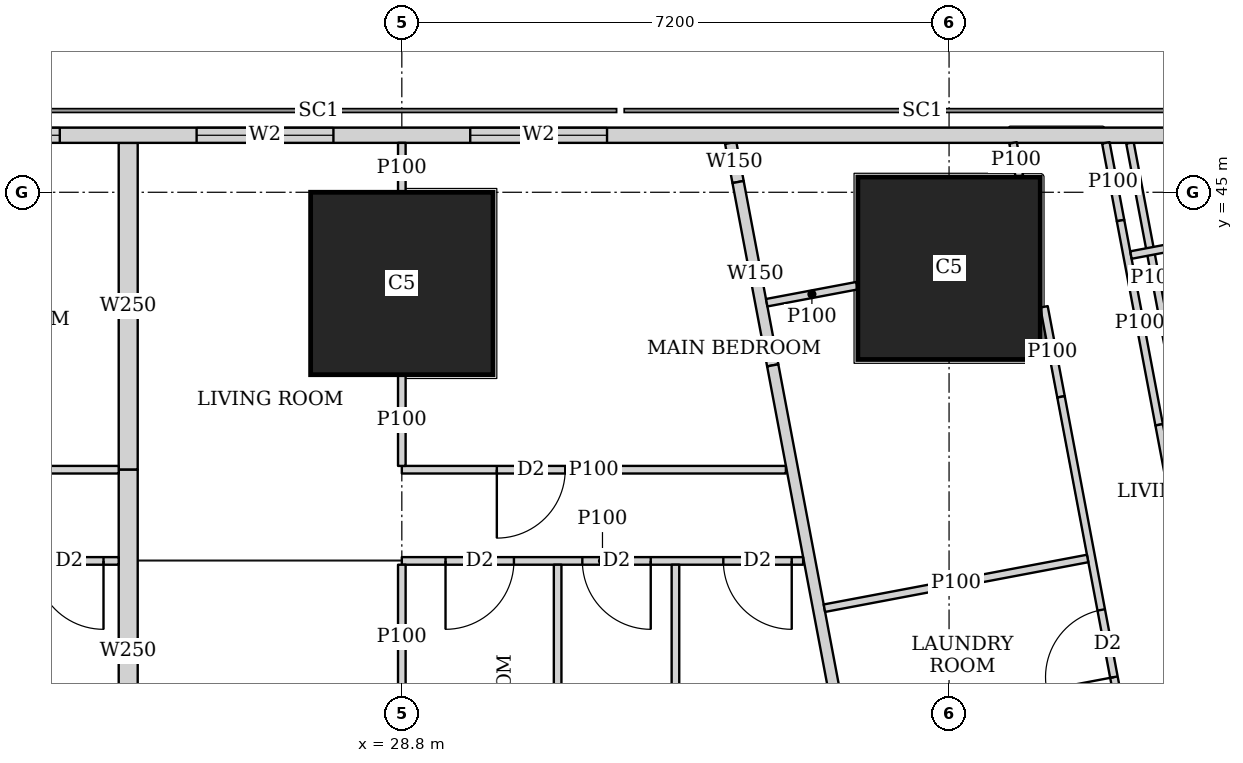
"""IFC4 building model, lengths in metres.
Left out: names, types, materials, properties, quantities, classifications, styles, units other than length and angle.
Written with IfcOpenShell. Run it as: python <this file> out.ifc"""

import sys

from ifc_helpers import new_model, si_unit, direction, frame, frame_2d, origin, origin_2d, place, context, subcontext, project, spatial, rectangle, extrude, element, fill, save


model = new_model("IFC4")
c1 = context("Model", 3, precision=1e-05, world=origin(), true_north=direction((0.0, 1.0)))
c2 = subcontext(c1, "Body", "Model", "MODEL_VIEW")
j1 = project(units=[si_unit("LENGTHUNIT", "METRE"), si_unit("PLANEANGLEUNIT", "RADIAN")], contexts=[c1])
p1 = place(None, origin())
s1 = spatial("IfcSite", under=j1, at=p1, CompositionType="ELEMENT")
p2 = place(p1, origin())
s2 = spatial("IfcBuilding", under=s1, at=p2, CompositionType="ELEMENT")
p3 = place(p2, frame((0.0, 0.0, 204.95)))
s3 = spatial("IfcBuildingStorey", under=s2, at=p3, CompositionType="ELEMENT", Elevation=204.95)
for number, where, z_axis, x_axis in (
    (1, (28.8, 43.8, 0.0), (0.0, 0.0, 1.0), (1.0, 0.0, 0.0)),
    (2, (36.0, 44.0, 0.0), (0.0, 0.0, 1.0), (1.0, 0.0, 0.0)),
):
    element("IfcColumn", number, at=place(p3, frame(where, z_axis=z_axis, x_axis=x_axis)), inside=s3, PredefinedType="COLUMN", context=c2, shape_type="SweptSolid", body=[
        extrude(rectangle(XDim=2.4, YDim=2.4, at=origin_2d()), origin(), (0.0, 0.0, 1.0), 3.75),
    ])
p4 = place(p3, frame((40.106, 45.75, 0.0), z_axis=(0.0, 0.0, 1.0), x_axis=(-1.0, 0.0, 0.0)))
e3 = element("IfcWall", 3, at=p4, inside=s3, PredefinedType="SOLIDWALL", context=c2, shape_type="SweptSolid", body=[
    extrude(rectangle(XDim=32.743, YDim=0.2, at=frame_2d((16.372, 0.0))), origin(), (0.0, 0.0, 1.0), 3.5),
])
p5 = place(p4, frame((8.606, 0.0, 0.9)))
e4 = element("IfcOpeningElement", 4, at=p5, cuts=e3, PredefinedType="OPENING", context=c2, shape_type="SweptSolid", body=[
    extrude(rectangle(XDim=1.8, YDim=1.5, at=frame_2d((0.9, 0.75))), frame((0.0, 0.11, 0.0), z_axis=(0.0, -1.0, 0.0), x_axis=(1.0, 0.0, 0.0)), (0.0, 0.0, 1.0), 0.22),
])
p6 = place(p4, frame((12.206, 0.0, 0.9)))
e5 = element("IfcOpeningElement", 5, at=p6, cuts=e3, PredefinedType="OPENING", context=c2, shape_type="SweptSolid", body=[
    extrude(rectangle(XDim=1.8, YDim=1.5, at=frame_2d((0.9, 0.75))), frame((0.0, 0.11, 0.0), z_axis=(0.0, -1.0, 0.0), x_axis=(1.0, 0.0, 0.0)), (0.0, 0.0, 1.0), 0.22),
])
p7 = place(p4, frame((15.806, 0.0, 0.9)))
e6 = element("IfcOpeningElement", 6, at=p7, cuts=e3, PredefinedType="OPENING", context=c2, shape_type="SweptSolid", body=[
    extrude(rectangle(XDim=1.8, YDim=1.5, at=frame_2d((0.9, 0.75))), frame((0.0, 0.11, 0.0), z_axis=(0.0, -1.0, 0.0), x_axis=(1.0, 0.0, 0.0)), (0.0, 0.0, 1.0), 0.22),
])
p8 = place(p4, frame((19.406, 0.0, 0.9)))
e7 = element("IfcOpeningElement", 7, at=p8, cuts=e3, PredefinedType="OPENING", context=c2, shape_type="SweptSolid", body=[
    extrude(rectangle(XDim=1.8, YDim=1.5, at=frame_2d((0.9, 0.75))), frame((0.0, 0.11, 0.0), z_axis=(0.0, -1.0, 0.0), x_axis=(1.0, 0.0, 0.0)), (0.0, 0.0, 1.0), 0.22),
])
p9 = place(p4, frame((23.006, 0.0, 0.9)))
e8 = element("IfcOpeningElement", 8, at=p9, cuts=e3, PredefinedType="OPENING", context=c2, shape_type="SweptSolid", body=[
    extrude(rectangle(XDim=1.8, YDim=1.5, at=frame_2d((0.9, 0.75))), frame((0.0, 0.11, 0.0), z_axis=(0.0, -1.0, 0.0), x_axis=(1.0, 0.0, 0.0)), (0.0, 0.0, 1.0), 0.22),
])
p10 = place(p4, frame((28.025, 0.0, 0.9)))
e9 = element("IfcOpeningElement", 9, at=p10, cuts=e3, PredefinedType="OPENING", context=c2, shape_type="SweptSolid", body=[
    extrude(rectangle(XDim=2.4, YDim=1.5, at=frame_2d((1.2, 0.75))), frame((0.0, 0.11, 0.0), z_axis=(0.0, -1.0, 0.0), x_axis=(1.0, 0.0, 0.0)), (0.0, 0.0, 1.0), 0.22),
])
p11 = place(p3, frame((33.127, 45.65, 0.0), z_axis=(0.0, 0.0, 1.0), x_axis=(0.185441815104, -0.982655246366, 0.0)))
e10 = element("IfcWall", 10, at=p11, inside=s3, PredefinedType="SOLIDWALL", context=c2, shape_type="SweptSolid", body=[
    extrude(rectangle(XDim=0.524, YDim=0.15, at=frame_2d((0.262, 0.0))), origin(), (0.0, 0.0, 1.0), 3.5),
])
p12 = place(p3, frame((33.224, 45.135, 0.0), z_axis=(0.0, 0.0, 1.0), x_axis=(0.185681462868, -0.982609990967, 0.0)))
e11 = element("IfcWall", 11, at=p12, inside=s3, PredefinedType="SOLIDWALL", context=c2, shape_type="SweptSolid", body=[
    extrude(rectangle(XDim=2.455, YDim=0.15, at=frame_2d((1.228, 0.0))), origin(), (0.0, 0.0, 1.0), 2.05),
])
p13 = place(p3, frame((33.68, 42.723, 0.0), z_axis=(0.0, 0.0, 1.0), x_axis=(0.185601160014, -0.982625162207, 0.0)))
e12 = element("IfcWall", 12, at=p13, inside=s3, PredefinedType="SOLIDWALL", context=c2, shape_type="SweptSolid", body=[
    extrude(rectangle(XDim=41.051, YDim=0.15, at=frame_2d((20.526, 0.0))), origin(), (0.0, 0.0, 1.0), 2.5),
])
p14 = place(p13, frame((12.307, 0.0, 0.0)))
e13 = element("IfcOpeningElement", 13, at=p14, cuts=e12, PredefinedType="OPENING", context=c2, shape_type="SweptSolid", body=[
    extrude(rectangle(XDim=1.0, YDim=2.1, at=frame_2d((0.5, 1.05))), frame((0.0, 0.085, 0.0), z_axis=(0.0, -1.0, 0.0), x_axis=(1.0, 0.0, 0.0)), (0.0, 0.0, 1.0), 0.17),
])
p15 = place(p13, frame((16.123, 0.0, 0.0)))
e14 = element("IfcOpeningElement", 14, at=p15, cuts=e12, PredefinedType="OPENING", context=c2, shape_type="SweptSolid", body=[
    extrude(rectangle(XDim=1.0, YDim=2.1, at=frame_2d((0.5, 1.05))), frame((0.0, 0.085, 0.0), z_axis=(0.0, -1.0, 0.0), x_axis=(1.0, 0.0, 0.0)), (0.0, 0.0, 1.0), 0.17),
])
p16 = place(p13, frame((30.902, 0.0, 0.0)))
e15 = element("IfcOpeningElement", 15, at=p16, cuts=e12, PredefinedType="OPENING", context=c2, shape_type="SweptSolid", body=[
    extrude(rectangle(XDim=1.0, YDim=2.1, at=frame_2d((0.5, 1.05))), frame((0.0, 0.085, 0.0), z_axis=(0.0, -1.0, 0.0), x_axis=(1.0, 0.0, 0.0)), (0.0, 0.0, 1.0), 0.17),
])
p17 = place(p3, frame((39.054, 42.085, 0.0), z_axis=(0.0, 0.0, 1.0), x_axis=(-0.185791584218, 0.982589175207, 0.0)))
e16 = element("IfcWall", 16, at=p17, inside=s3, PredefinedType="PARTITIONING", context=c2, shape_type="SweptSolid", body=[
    extrude(rectangle(XDim=3.628, YDim=0.1, at=frame_2d((1.814, 0.0))), origin(), (0.0, 0.0, 1.0), 2.05),
])
p18 = place(p3, frame((38.063, 45.65, 0.0), z_axis=(0.0, 0.0, 1.0), x_axis=(0.185677287841, -0.982610779902, 0.0)))
e17 = element("IfcWall", 17, at=p18, inside=s3, PredefinedType="PARTITIONING", context=c2, shape_type="SweptSolid", body=[
    extrude(rectangle(XDim=1.04, YDim=0.1, at=frame_2d((0.52, 0.0))), origin(), (0.0, 0.0, 1.0), 3.5),
])
p19 = place(p3, frame((38.256, 44.628, 0.0), z_axis=(0.0, 0.0, 1.0), x_axis=(0.185700639943, -0.982606366927, 0.0)))
e18 = element("IfcWall", 18, at=p19, inside=s3, PredefinedType="PARTITIONING", context=c2, shape_type="SweptSolid", body=[
    extrude(rectangle(XDim=2.735, YDim=0.1, at=frame_2d((1.367, 0.0))), origin(), (0.0, 0.0, 1.0), 2.05),
])
p20 = place(p3, frame((38.764, 41.941, 0.0), z_axis=(0.0, 0.0, 1.0), x_axis=(0.185548572312, -0.982635093671, 0.0)))
e19 = element("IfcWall", 19, at=p20, inside=s3, PredefinedType="PARTITIONING", context=c2, shape_type="SweptSolid", body=[
    extrude(rectangle(XDim=9.135, YDim=0.1, at=frame_2d((4.568, 0.0))), origin(), (0.0, 0.0, 1.0), 3.5),
])
p21 = place(p20, frame((8.085, 0.0, 0.0)))
e20 = element("IfcOpeningElement", 20, at=p21, cuts=e19, PredefinedType="OPENING", context=c2, shape_type="SweptSolid", body=[
    extrude(rectangle(XDim=0.9, YDim=2.1, at=frame_2d((0.45, 1.05))), frame((0.0, 0.06, 0.0), z_axis=(0.0, -1.0, 0.0), x_axis=(1.0, 0.0, 0.0)), (0.0, 0.0, 1.0), 0.12),
])
p22 = place(p20, frame((3.7, 0.0, 0.0)))
e21 = element("IfcOpeningElement", 21, at=p22, cuts=e19, PredefinedType="OPENING", context=c2, shape_type="SweptSolid", body=[
    extrude(rectangle(XDim=0.9, YDim=2.1, at=frame_2d((0.45, 1.05))), frame((0.0, 0.06, 0.0), z_axis=(0.0, -1.0, 0.0), x_axis=(1.0, 0.0, 0.0)), (0.0, 0.0, 1.0), 0.12),
])
p23 = place(p3, frame((36.842, 45.65, 0.0), z_axis=(0.0, 0.0, 1.0), x_axis=(0.185407859198, -0.982661653748, 0.0)))
e22 = element("IfcWall", 22, at=p23, inside=s3, PredefinedType="PARTITIONING", context=c2, shape_type="SweptSolid", body=[
    extrude(rectangle(XDim=0.448, YDim=0.1, at=frame_2d((0.224, 0.0))), origin(), (0.0, 0.0, 1.0), 3.5),
])
p24 = place(p3, frame((37.249, 43.493, 0.0), z_axis=(0.0, 0.0, 1.0), x_axis=(0.185817643817, -0.982584247404, 0.0)))
e23 = element("IfcWall", 23, at=p24, inside=s3, PredefinedType="PARTITIONING", context=c2, shape_type="SweptSolid", body=[
    extrude(rectangle(XDim=1.205, YDim=0.1, at=frame_2d((0.603, 0.0))), origin(), (0.0, 0.0, 1.0), 2.05),
])
p25 = place(p3, frame((37.473, 42.309, 0.0), z_axis=(0.0, 0.0, 1.0), x_axis=(0.185491912953, -0.982645790827, 0.0)))
e24 = element("IfcWall", 24, at=p25, inside=s3, PredefinedType="PARTITIONING", context=c2, shape_type="SweptSolid", body=[
    extrude(rectangle(XDim=9.737, YDim=0.1, at=frame_2d((4.869, 0.0))), origin(), (0.0, 0.0, 1.0), 3.5),
])
p26 = place(p25, frame((8.312, 0.0, 0.0)))
e25 = element("IfcOpeningElement", 25, at=p26, cuts=e24, PredefinedType="OPENING", context=c2, shape_type="SweptSolid", body=[
    extrude(rectangle(XDim=0.9, YDim=2.1, at=frame_2d((0.45, 1.05))), frame((0.0, 0.06, 0.0), z_axis=(0.0, -1.0, 0.0), x_axis=(1.0, 0.0, 0.0)), (0.0, 0.0, 1.0), 0.12),
])
p27 = place(p25, frame((2.853, 0.0, 0.0)))
e26 = element("IfcOpeningElement", 26, at=p27, cuts=e24, PredefinedType="OPENING", context=c2, shape_type="SweptSolid", body=[
    extrude(rectangle(XDim=0.9, YDim=2.1, at=frame_2d((0.45, 1.05))), frame((0.0, 0.06, 0.0), z_axis=(0.0, -1.0, 0.0), x_axis=(1.0, 0.0, 0.0)), (0.0, 0.0, 1.0), 0.12),
])
p28 = place(p25, frame((5.644, 0.0, 0.0)))
e27 = element("IfcOpeningElement", 27, at=p28, cuts=e24, PredefinedType="OPENING", context=c2, shape_type="SweptSolid", body=[
    extrude(rectangle(XDim=0.9, YDim=2.1, at=frame_2d((0.45, 1.05))), frame((0.0, 0.06, 0.0), z_axis=(0.0, -1.0, 0.0), x_axis=(1.0, 0.0, 0.0)), (0.0, 0.0, 1.0), 0.12),
])
p29 = place(p3, frame((41.968, 44.85, 0.0), z_axis=(0.0, 0.0, 1.0), x_axis=(-0.98258614234, -0.185807623311, 0.0)))
e28 = element("IfcWall", 28, at=p29, inside=s3, PredefinedType="PARTITIONING", context=c2, shape_type="SweptSolid", body=[
    extrude(rectangle(XDim=3.638, YDim=0.1, at=frame_2d((1.819, 0.0))), origin(), (0.0, 0.0, 1.0), 2.05),
])
p30 = place(p3, frame((34.79, 43.771, 0.0), z_axis=(0.0, 0.0, 1.0), x_axis=(-0.982730261052, -0.18504387051, 0.0)))
e29 = element("IfcWall", 29, at=p30, inside=s3, PredefinedType="PARTITIONING", context=c2, shape_type="SweptSolid", body=[
    extrude(rectangle(XDim=1.21, YDim=0.1, at=frame_2d((0.605, 0.0))), origin(), (0.0, 0.0, 1.0), 2.05),
])
p31 = place(p3, frame((37.823, 40.182, 0.0), z_axis=(0.0, 0.0, 1.0), x_axis=(-0.98263926043, -0.185526504472, 0.0)))
e30 = element("IfcWall", 30, at=p31, inside=s3, PredefinedType="PARTITIONING", context=c2, shape_type="SweptSolid", body=[
    extrude(rectangle(XDim=3.524, YDim=0.1, at=frame_2d((1.762, 0.0))), origin(), (0.0, 0.0, 1.0), 3.5),
])
p32 = place(p3, frame((21.6, 41.35, 0.0), z_axis=(0.0, 0.0, 1.0), x_axis=(1.0, 0.0, 0.0)))
e31 = element("IfcWall", 31, at=p32, inside=s3, PredefinedType="PARTITIONING", context=c2, shape_type="SweptSolid", body=[
    extrude(rectangle(XDim=3.475, YDim=0.1, at=frame_2d((1.737, 0.0))), origin(), (0.0, 0.0, 1.0), 3.5),
])
p33 = place(p32, frame((0.2, 0.0, 0.0)))
e32 = element("IfcOpeningElement", 32, at=p33, cuts=e31, PredefinedType="OPENING", context=c2, shape_type="SweptSolid", body=[
    extrude(rectangle(XDim=0.9, YDim=2.1, at=frame_2d((0.45, 1.05))), frame((0.0, 0.06, 0.0), z_axis=(0.0, -1.0, 0.0), x_axis=(1.0, 0.0, 0.0)), (0.0, 0.0, 1.0), 0.12),
])
p34 = place(p3, frame((21.6, 40.15, 0.0), z_axis=(0.0, 0.0, 1.0), x_axis=(1.0, 0.0, 0.0)))
e33 = element("IfcWall", 33, at=p34, inside=s3, PredefinedType="PARTITIONING", context=c2, shape_type="SweptSolid", body=[
    extrude(rectangle(XDim=3.475, YDim=0.1, at=frame_2d((1.737, 0.0))), origin(), (0.0, 0.0, 1.0), 3.5),
])
p35 = place(p34, frame((0.575, 0.0, 0.0)))
e34 = element("IfcOpeningElement", 34, at=p35, cuts=e33, PredefinedType="OPENING", context=c2, shape_type="SweptSolid", body=[
    extrude(rectangle(XDim=0.9, YDim=2.1, at=frame_2d((0.45, 1.05))), frame((0.0, 0.06, 0.0), z_axis=(0.0, -1.0, 0.0), x_axis=(1.0, 0.0, 0.0)), (0.0, 0.0, 1.0), 0.12),
])
p36 = place(p34, frame((2.375, 0.0, 0.0)))
e35 = element("IfcOpeningElement", 35, at=p36, cuts=e33, PredefinedType="OPENING", context=c2, shape_type="SweptSolid", body=[
    extrude(rectangle(XDim=0.9, YDim=2.1, at=frame_2d((0.45, 1.05))), frame((0.0, 0.06, 0.0), z_axis=(0.0, -1.0, 0.0), x_axis=(1.0, 0.0, 0.0)), (0.0, 0.0, 1.0), 0.12),
])
p37 = place(p3, frame((28.8, 41.35, 0.0), z_axis=(0.0, 0.0, 1.0), x_axis=(1.0, 0.0, 0.0)))
e36 = element("IfcWall", 36, at=p37, inside=s3, PredefinedType="PARTITIONING", context=c2, shape_type="SweptSolid", body=[
    extrude(rectangle(XDim=5.053, YDim=0.1, at=frame_2d((2.526, 0.0))), origin(), (0.0, 0.0, 1.0), 3.5),
])
p38 = place(p37, frame((1.25, 0.0, 0.0)))
e37 = element("IfcOpeningElement", 37, at=p38, cuts=e36, PredefinedType="OPENING", context=c2, shape_type="SweptSolid", body=[
    extrude(rectangle(XDim=0.9, YDim=2.1, at=frame_2d((0.45, 1.05))), frame((0.0, 0.06, 0.0), z_axis=(0.0, -1.0, 0.0), x_axis=(1.0, 0.0, 0.0)), (0.0, 0.0, 1.0), 0.12),
])
p39 = place(p3, frame((28.8, 40.15, 0.0), z_axis=(0.0, 0.0, 1.0), x_axis=(1.0, 0.0, 0.0)))
e38 = element("IfcWall", 38, at=p39, inside=s3, PredefinedType="PARTITIONING", context=c2, shape_type="SweptSolid", body=[
    extrude(rectangle(XDim=5.28, YDim=0.1, at=frame_2d((2.64, 0.0))), origin(), (0.0, 0.0, 1.0), 3.5),
])
p40 = place(p39, frame((0.575, 0.0, 0.0)))
e39 = element("IfcOpeningElement", 39, at=p40, cuts=e38, PredefinedType="OPENING", context=c2, shape_type="SweptSolid", body=[
    extrude(rectangle(XDim=0.9, YDim=2.1, at=frame_2d((0.45, 1.05))), frame((0.0, 0.06, 0.0), z_axis=(0.0, -1.0, 0.0), x_axis=(1.0, 0.0, 0.0)), (0.0, 0.0, 1.0), 0.12),
])
p41 = place(p39, frame((4.23, 0.0, 0.0)))
e40 = element("IfcOpeningElement", 40, at=p41, cuts=e38, PredefinedType="OPENING", context=c2, shape_type="SweptSolid", body=[
    extrude(rectangle(XDim=0.9, YDim=2.1, at=frame_2d((0.45, 1.05))), frame((0.0, 0.06, 0.0), z_axis=(0.0, -1.0, 0.0), x_axis=(1.0, 0.0, 0.0)), (0.0, 0.0, 1.0), 0.12),
])
p42 = place(p39, frame((2.375, 0.0, 0.0)))
e41 = element("IfcOpeningElement", 41, at=p42, cuts=e38, PredefinedType="OPENING", context=c2, shape_type="SweptSolid", body=[
    extrude(rectangle(XDim=0.9, YDim=2.1, at=frame_2d((0.45, 1.05))), frame((0.0, 0.06, 0.0), z_axis=(0.0, -1.0, 0.0), x_axis=(1.0, 0.0, 0.0)), (0.0, 0.0, 1.0), 0.12),
])
p43 = place(p3, frame((28.8, 41.4, 0.0), z_axis=(0.0, 0.0, 1.0), x_axis=(0.0, 1.0, 0.0)))
e42 = element("IfcWall", 42, at=p43, inside=s3, PredefinedType="PARTITIONING", context=c2, shape_type="SweptSolid", body=[
    extrude(rectangle(XDim=1.199, YDim=0.1, at=frame_2d((0.6, 0.0))), origin(), (0.0, 0.0, 1.0), 3.5),
])
p44 = place(p3, frame((28.8, 45.001, 0.0), z_axis=(0.0, 0.0, 1.0), x_axis=(0.0, 1.0, 0.0)))
e43 = element("IfcWall", 43, at=p44, inside=s3, PredefinedType="PARTITIONING", context=c2, shape_type="SweptSolid", body=[
    extrude(rectangle(XDim=0.649, YDim=0.1, at=frame_2d((0.324, 0.0))), origin(), (0.0, 0.0, 1.0), 3.5),
])
p45 = place(p3, frame((28.8, 38.201, 0.0), z_axis=(0.0, 0.0, 1.0), x_axis=(0.0, 1.0, 0.0)))
e44 = element("IfcWall", 44, at=p45, inside=s3, PredefinedType="PARTITIONING", context=c2, shape_type="SweptSolid", body=[
    extrude(rectangle(XDim=1.899, YDim=0.1, at=frame_2d((0.95, 0.0))), origin(), (0.0, 0.0, 1.0), 3.5),
])
for number, where, z_axis, x_axis in (
    (45, (32.4, 36.575, 0.0), (0.0, 0.0, 1.0), (0.0, 1.0, 0.0)),
    (46, (30.85, 36.575, 0.0), (0.0, 0.0, 1.0), (0.0, 1.0, 0.0)),
):
    element("IfcWall", number, at=place(p3, frame(where, z_axis=z_axis, x_axis=x_axis)), inside=s3, PredefinedType="PARTITIONING", context=c2, shape_type="SweptSolid", body=[
        extrude(rectangle(XDim=3.525, YDim=0.1, at=frame_2d((1.763, 0.0))), origin(), (0.0, 0.0, 1.0), 3.5),
    ])
p46 = place(p3, frame((25.2, 41.35, 0.0), z_axis=(0.0, 0.0, 1.0), x_axis=(0.0, 1.0, 0.0)))
e47 = element("IfcWall", 47, at=p46, inside=s3, PredefinedType="SOLIDWALL", context=c2, shape_type="SweptSolid", body=[
    extrude(rectangle(XDim=4.3, YDim=0.25, at=frame_2d((2.15, 0.0))), origin(), (0.0, 0.0, 1.0), 2.05),
])
p47 = place(p3, frame((25.2, 36.575, 0.0), z_axis=(0.0, 0.0, 1.0), x_axis=(0.0, 1.0, 0.0)))
e48 = element("IfcWall", 48, at=p47, inside=s3, PredefinedType="SOLIDWALL", context=c2, shape_type="SweptSolid", body=[
    extrude(rectangle(XDim=4.775, YDim=0.25, at=frame_2d((2.388, 0.0))), origin(), (0.0, 0.0, 1.0), 3.5),
])
p48 = place(p5, origin())
e49 = element("IfcWindow", 49, at=p48, inside=s3, PartitioningType="SINGLE_PANEL", PredefinedType="WINDOW", context=c2, shape_type="SweptSolid", body=[
    extrude(rectangle(XDim=1.8, YDim=1.5, at=frame_2d((0.9, 0.75))), frame((0.0, 0.03, 0.0), z_axis=(0.0, -1.0, 0.0), x_axis=(1.0, 0.0, 0.0)), (0.0, 0.0, 1.0), 0.06),
])
fill(e4, e49)
p49 = place(p6, origin())
e50 = element("IfcWindow", 50, at=p49, inside=s3, PartitioningType="SINGLE_PANEL", PredefinedType="WINDOW", context=c2, shape_type="SweptSolid", body=[
    extrude(rectangle(XDim=1.8, YDim=1.5, at=frame_2d((0.9, 0.75))), frame((0.0, 0.03, 0.0), z_axis=(0.0, -1.0, 0.0), x_axis=(1.0, 0.0, 0.0)), (0.0, 0.0, 1.0), 0.06),
])
fill(e5, e50)
p50 = place(p7, origin())
e51 = element("IfcWindow", 51, at=p50, inside=s3, PartitioningType="SINGLE_PANEL", PredefinedType="WINDOW", context=c2, shape_type="SweptSolid", body=[
    extrude(rectangle(XDim=1.8, YDim=1.5, at=frame_2d((0.9, 0.75))), frame((0.0, 0.03, 0.0), z_axis=(0.0, -1.0, 0.0), x_axis=(1.0, 0.0, 0.0)), (0.0, 0.0, 1.0), 0.06),
])
fill(e6, e51)
p51 = place(p27, origin())
e52 = element("IfcDoor", 52, at=p51, inside=s3, OperationType="SINGLE_SWING_LEFT", PredefinedType="DOOR", context=c2, shape_type="SweptSolid", body=[
    extrude(rectangle(XDim=0.9, YDim=2.1, at=frame_2d((0.45, 1.05))), frame((0.0, 0.025, 0.0), z_axis=(0.0, -1.0, 0.0), x_axis=(1.0, 0.0, 0.0)), (0.0, 0.0, 1.0), 0.05),
])
fill(e26, e52)
p52 = place(p36, origin())
e53 = element("IfcDoor", 53, at=p52, inside=s3, OperationType="SINGLE_SWING_LEFT", PredefinedType="DOOR", context=c2, shape_type="SweptSolid", body=[
    extrude(rectangle(XDim=0.9, YDim=2.1, at=frame_2d((0.45, 1.05))), frame((0.0, 0.025, 0.0), z_axis=(0.0, -1.0, 0.0), x_axis=(1.0, 0.0, 0.0)), (0.0, 0.0, 1.0), 0.05),
])
fill(e35, e53)
p53 = place(p38, origin())
e54 = element("IfcDoor", 54, at=p53, inside=s3, OperationType="SINGLE_SWING_RIGHT", PredefinedType="DOOR", context=c2, shape_type="SweptSolid", body=[
    extrude(rectangle(XDim=0.9, YDim=2.1, at=frame_2d((0.45, 1.05))), frame((0.0, 0.025, 0.0), z_axis=(0.0, -1.0, 0.0), x_axis=(1.0, 0.0, 0.0)), (0.0, 0.0, 1.0), 0.05),
])
fill(e37, e54)
p54 = place(p40, origin())
e55 = element("IfcDoor", 55, at=p54, inside=s3, OperationType="SINGLE_SWING_RIGHT", PredefinedType="DOOR", context=c2, shape_type="SweptSolid", body=[
    extrude(rectangle(XDim=0.9, YDim=2.1, at=frame_2d((0.45, 1.05))), frame((0.0, 0.025, 0.0), z_axis=(0.0, -1.0, 0.0), x_axis=(1.0, 0.0, 0.0)), (0.0, 0.0, 1.0), 0.05),
])
fill(e39, e55)
p55 = place(p41, origin())
e56 = element("IfcDoor", 56, at=p55, inside=s3, OperationType="SINGLE_SWING_LEFT", PredefinedType="DOOR", context=c2, shape_type="SweptSolid", body=[
    extrude(rectangle(XDim=0.9, YDim=2.1, at=frame_2d((0.45, 1.05))), frame((0.0, 0.025, 0.0), z_axis=(0.0, -1.0, 0.0), x_axis=(1.0, 0.0, 0.0)), (0.0, 0.0, 1.0), 0.05),
])
fill(e40, e56)
p56 = place(p42, origin())
e57 = element("IfcDoor", 57, at=p56, inside=s3, OperationType="SINGLE_SWING_LEFT", PredefinedType="DOOR", context=c2, shape_type="SweptSolid", body=[
    extrude(rectangle(XDim=0.9, YDim=2.1, at=frame_2d((0.45, 1.05))), frame((0.0, 0.025, 0.0), z_axis=(0.0, -1.0, 0.0), x_axis=(1.0, 0.0, 0.0)), (0.0, 0.0, 1.0), 0.05),
])
fill(e41, e57)
save(model, sys.argv[1])
